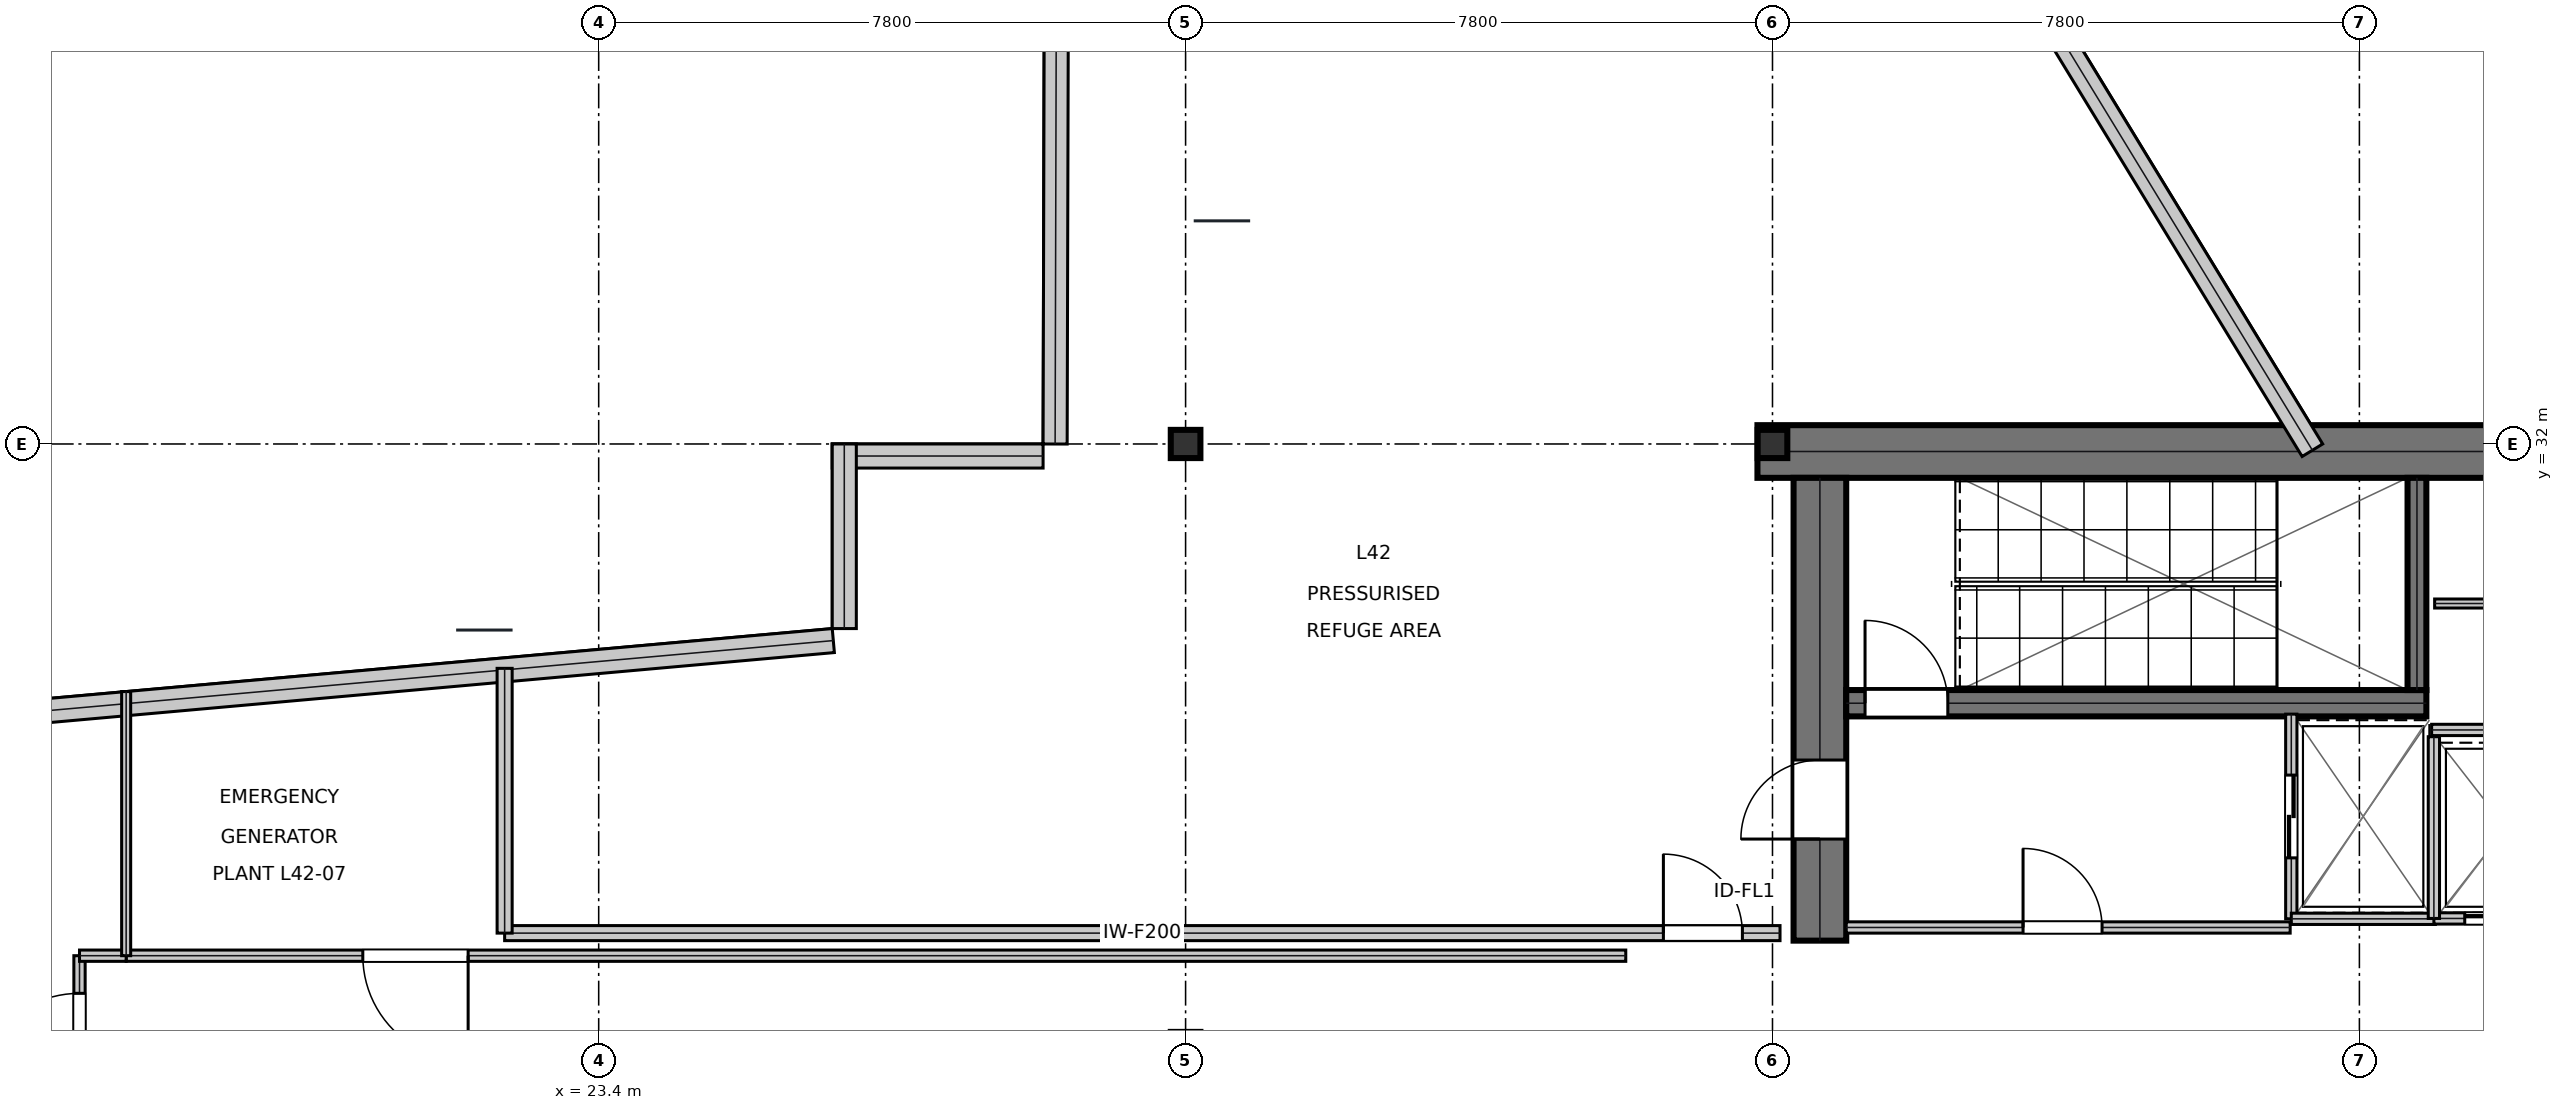
"""IFC4 building model, lengths in metres.
Left out: names, types, materials, properties, quantities, classifications, styles, units other than length and angle.
Written with IfcOpenShell. Run it as: python <this file> out.ifc"""

import sys

from ifc_helpers import new_model, si_unit, direction, frame, frame_2d, origin, origin_2d, place, context, subcontext, project, spatial, rectangle, i_section, extrude, element, fill, save


model = new_model("IFC4")
c1 = context("Model", 3, precision=1e-05, world=origin(), true_north=direction((0.0, 1.0)))
c2 = subcontext(c1, "Body", "Model", "MODEL_VIEW")
j1 = project(units=[si_unit("LENGTHUNIT", "METRE"), si_unit("PLANEANGLEUNIT", "RADIAN")], contexts=[c1])
p1 = place(None, origin())
s1 = spatial("IfcSite", under=j1, at=p1, CompositionType="ELEMENT")
p2 = place(p1, origin())
s2 = spatial("IfcBuilding", under=s1, at=p2, CompositionType="ELEMENT")
p3 = place(p2, frame((0.0, 0.0, 181.65)))
s3 = spatial("IfcBuildingStorey", under=s2, at=p3, CompositionType="ELEMENT", Elevation=181.65)
p4 = place(p3, frame((38.8, 31.9, 0.0), z_axis=(0.0, 0.0, 1.0), x_axis=(1.0, 0.0, 0.0)))
e1 = element("IfcWall", 1, at=p4, inside=s3, PredefinedType="SHEAR", context=c2, shape_type="SweptSolid", body=[
    extrude(rectangle(XDim=16.0, YDim=0.7, at=frame_2d((8.0, 0.0))), origin(), (0.0, 0.0, 1.0), 5.12),
])
p5 = place(p3, frame((39.63, 25.4, 0.0), z_axis=(0.0, 0.0, 1.0), x_axis=(0.0, 1.0, 0.0)))
e2 = element("IfcWall", 2, at=p5, inside=s3, PredefinedType="SHEAR", context=c2, shape_type="SweptSolid", body=[
    extrude(rectangle(XDim=6.15, YDim=0.7, at=frame_2d((3.075, 0.0))), origin(), (0.0, 0.0, 1.0), 5.12),
])
p6 = place(p5, frame((1.35, 0.0, 0.0)))
e3 = element("IfcOpeningElement", 3, at=p6, cuts=e2, PredefinedType="OPENING", context=c2, shape_type="SweptSolid", body=[
    extrude(rectangle(XDim=1.05, YDim=2.15, at=frame_2d((0.525, 1.075))), frame((0.0, 0.36, 0.0), z_axis=(0.0, -1.0, 0.0), x_axis=(1.0, 0.0, 0.0)), (0.0, 0.0, 1.0), 0.72),
])
p7 = place(p3, frame((39.98, 28.555, 0.0), z_axis=(0.0, 0.0, 1.0), x_axis=(1.0, 0.0, 0.0)))
e4 = element("IfcWall", 4, at=p7, inside=s3, PredefinedType="SHEAR", context=c2, shape_type="SweptSolid", body=[
    extrude(rectangle(XDim=7.71, YDim=0.35, at=frame_2d((3.855, 0.0))), origin(), (0.0, 0.0, 1.0), 5.12),
])
p8 = place(p7, frame((0.25, 0.0, 0.0)))
e5 = element("IfcOpeningElement", 5, at=p8, cuts=e4, PredefinedType="OPENING", context=c2, shape_type="SweptSolid", body=[
    extrude(rectangle(XDim=1.1, YDim=2.15, at=frame_2d((0.55, 1.075))), frame((0.0, 0.185, 0.0), z_axis=(0.0, -1.0, 0.0), x_axis=(1.0, 0.0, 0.0)), (0.0, 0.0, 1.0), 0.37),
])
p9 = place(p3, frame((47.565, 28.73, 0.0), z_axis=(0.0, 0.0, 1.0), x_axis=(0.0, 1.0, 0.0)))
e6 = element("IfcWall", 6, at=p9, inside=s3, PredefinedType="SHEAR", context=c2, shape_type="SweptSolid", body=[
    extrude(rectangle(XDim=2.82, YDim=0.25, at=frame_2d((1.41, 0.0))), origin(), (0.0, 0.0, 1.0), 5.12),
])
for number, where, z_axis, x_axis in (
    (7, (31.2, 32.0, 0.0), (0.0, 0.0, 1.0), (1.0, 0.0, 0.0)),
    (8, (39.0, 32.0, 0.0), (0.0, 0.0, 1.0), (1.0, 0.0, 0.0)),
):
    element("IfcColumn", number, at=place(p3, frame(where, z_axis=z_axis, x_axis=x_axis)), inside=s3, PredefinedType="COLUMN", context=c2, shape_type="SweptSolid", body=[
        extrude(i_section(OverallWidth=0.394, OverallDepth=0.375, WebThickness=0.017, FlangeThickness=0.028, at=origin_2d()), origin(), (0.0, 0.0, 1.0), 5.394),
    ])
p10 = place(p3, frame((46.176, 31.917, 0.0), z_axis=(0.0, 0.0, 1.0), x_axis=(-0.520630135962, 0.853782326784, 0.0)))
e9 = element("IfcWall", 9, at=p10, inside=s3, PredefinedType="STANDARD", context=c2, shape_type="SweptSolid", body=[
    extrude(rectangle(XDim=9.747, YDim=0.32, at=frame_2d((4.874, 0.0))), origin(), (0.0, 0.0, 1.0), 4.649),
])
p11 = place(p3, frame((29.489, 40.453, 0.0), z_axis=(0.0, 0.0, 1.0), x_axis=(-0.002657107071, -0.999996469885, 0.0)))
e10 = element("IfcWall", 10, at=p11, inside=s3, PredefinedType="STANDARD", context=c2, shape_type="SweptSolid", body=[
    extrude(rectangle(XDim=8.453, YDim=0.32, at=frame_2d((4.227, 0.0))), origin(), (0.0, 0.0, 1.0), 5.12),
])
p12 = place(p3, frame((29.306, 31.84, 0.0), z_axis=(0.0, 0.0, 1.0), x_axis=(-1.0, 0.0, 0.0)))
e11 = element("IfcWall", 11, at=p12, inside=s3, PredefinedType="STANDARD", context=c2, shape_type="SweptSolid", body=[
    extrude(rectangle(XDim=2.802, YDim=0.32, at=frame_2d((1.401, 0.0))), origin(), (0.0, 0.0, 1.0), 5.12),
])
p13 = place(p3, frame((26.664, 32.0, 0.0), z_axis=(0.0, 0.0, 1.0), x_axis=(0.0, -1.0, 0.0)))
e12 = element("IfcWall", 12, at=p13, inside=s3, PredefinedType="STANDARD", context=c2, shape_type="SweptSolid", body=[
    extrude(rectangle(XDim=2.453, YDim=0.32, at=frame_2d((1.227, 0.0))), origin(), (0.0, 0.0, 1.0), 4.649),
])
p14 = place(p3, frame((26.518, 29.387, 0.0), z_axis=(0.0, 0.0, 1.0), x_axis=(-0.996045822268, -0.088840981215, 0.0)))
e13 = element("IfcWall", 13, at=p14, inside=s3, PredefinedType="STANDARD", context=c2, shape_type="SweptSolid", body=[
    extrude(rectangle(XDim=13.457, YDim=0.32, at=frame_2d((6.729, 0.0))), origin(), (0.0, 0.0, 1.0), 4.649),
])
p15 = place(p3, frame((39.98, 25.575, 0.0), z_axis=(0.0, 0.0, 1.0), x_axis=(1.0, 0.0, 0.0)))
e14 = element("IfcWall", 14, at=p15, inside=s3, PredefinedType="PARTITIONING", context=c2, shape_type="SweptSolid", body=[
    extrude(rectangle(XDim=5.9, YDim=0.15, at=frame_2d((2.95, 0.0))), origin(), (0.0, 0.0, 1.0), 5.12),
])
p16 = place(p15, frame((2.35, 0.0, 0.0)))
e15 = element("IfcOpeningElement", 15, at=p16, cuts=e14, PredefinedType="OPENING", context=c2, shape_type="SweptSolid", body=[
    extrude(rectangle(XDim=1.05, YDim=2.15, at=frame_2d((0.525, 1.075))), frame((0.0, 0.085, 0.0), z_axis=(0.0, -1.0, 0.0), x_axis=(1.0, 0.0, 0.0)), (0.0, 0.0, 1.0), 0.17),
])
p17 = place(p3, frame((45.895, 25.69, 0.0), z_axis=(0.0, 0.0, 1.0), x_axis=(0.0, 1.0, 0.0)))
e16 = element("IfcWall", 16, at=p17, inside=s3, PredefinedType="PARTITIONING", context=c2, shape_type="SweptSolid", body=[
    extrude(rectangle(XDim=2.72, YDim=0.15, at=frame_2d((1.36, 0.0))), origin(), (0.0, 0.0, 1.0), 5.12),
])
p18 = place(p17, frame((0.81, 0.0, 0.0)))
e17 = element("IfcOpeningElement", 17, at=p18, cuts=e16, PredefinedType="OPENING", context=c2, shape_type="SweptSolid", body=[
    extrude(rectangle(XDim=1.1, YDim=2.15, at=frame_2d((0.55, 1.075))), frame((0.0, 0.085, 0.0), z_axis=(0.0, -1.0, 0.0), x_axis=(1.0, 0.0, 0.0)), (0.0, 0.0, 1.0), 0.17),
])
p19 = place(p3, frame((45.895, 25.69, 0.0), z_axis=(0.0, 0.0, 1.0), x_axis=(1.0, 0.0, 0.0)))
e18 = element("IfcWall", 18, at=p19, inside=s3, PredefinedType="PARTITIONING", context=c2, shape_type="SweptSolid", body=[
    extrude(rectangle(XDim=1.915, YDim=0.15, at=frame_2d((0.958, 0.0))), origin(), (0.0, 0.0, 1.0), 5.12),
])
p20 = place(p3, frame((47.79, 25.695, 0.0), z_axis=(0.0, 0.0, 1.0), x_axis=(1.0, 0.0, 0.0)))
e19 = element("IfcWall", 19, at=p20, inside=s3, PredefinedType="PARTITIONING", context=c2, shape_type="SweptSolid", body=[
    extrude(rectangle(XDim=1.92, YDim=0.15, at=frame_2d((0.96, 0.0))), origin(), (0.0, 0.0, 1.0), 5.12),
])
p21 = place(p20, frame((0.41, 0.0, 0.0)))
e20 = element("IfcOpeningElement", 20, at=p21, cuts=e19, PredefinedType="OPENING", context=c2, shape_type="SweptSolid", body=[
    extrude(rectangle(XDim=1.1, YDim=2.15, at=frame_2d((0.55, 1.075))), frame((0.0, 0.085, 0.0), z_axis=(0.0, -1.0, 0.0), x_axis=(1.0, 0.0, 0.0)), (0.0, 0.0, 1.0), 0.17),
])
p22 = place(p3, frame((47.79, 25.695, 0.0), z_axis=(0.0, 0.0, 1.0), x_axis=(0.0, 1.0, 0.0)))
e21 = element("IfcWall", 21, at=p22, inside=s3, PredefinedType="PARTITIONING", context=c2, shape_type="SweptSolid", body=[
    extrude(rectangle(XDim=2.415, YDim=0.15, at=frame_2d((1.208, 0.0))), origin(), (0.0, 0.0, 1.0), 5.12),
])
p23 = place(p3, frame((47.76, 28.2, 0.0), z_axis=(0.0, 0.0, 1.0), x_axis=(1.0, 0.0, 0.0)))
e22 = element("IfcWall", 22, at=p23, inside=s3, PredefinedType="PARTITIONING", context=c2, shape_type="SweptSolid", body=[
    extrude(rectangle(XDim=1.99, YDim=0.15, at=frame_2d((0.995, 0.0))), origin(), (0.0, 0.0, 1.0), 5.12),
])
p24 = place(p3, frame((47.8, 29.88, 0.0), z_axis=(0.0, 0.0, 1.0), x_axis=(1.0, 0.0, 0.0)))
e23 = element("IfcWall", 23, at=p24, inside=s3, PredefinedType="PARTITIONING", context=c2, shape_type="SweptSolid", body=[
    extrude(rectangle(XDim=5.86, YDim=0.12, at=frame_2d((2.93, 0.0))), origin(), (0.0, 0.0, 1.0), 5.12),
])
p25 = place(p24, frame((2.5, 0.0, 0.0)))
e24 = element("IfcOpeningElement", 24, at=p25, cuts=e23, PredefinedType="OPENING", context=c2, shape_type="SweptSolid", body=[
    extrude(rectangle(XDim=0.85, YDim=2.15, at=frame_2d((0.425, 1.075))), frame((0.0, 0.07, 0.0), z_axis=(0.0, -1.0, 0.0), x_axis=(1.0, 0.0, 0.0)), (0.0, 0.0, 1.0), 0.14),
])
p26 = place(p3, frame((22.15, 25.5, 0.0), z_axis=(0.0, 0.0, 1.0), x_axis=(1.0, 0.0, 0.0)))
e25 = element("IfcWall", 25, at=p26, inside=s3, PredefinedType="SOLIDWALL", context=c2, shape_type="SweptSolid", body=[
    extrude(rectangle(XDim=16.95, YDim=0.2, at=frame_2d((8.475, 0.0))), origin(), (0.0, 0.0, 1.0), 4.571),
])
p27 = place(p26, frame((15.4, 0.0, 0.0)))
e26 = element("IfcOpeningElement", 26, at=p27, cuts=e25, PredefinedType="OPENING", context=c2, shape_type="SweptSolid", body=[
    extrude(rectangle(XDim=1.05, YDim=2.15, at=frame_2d((0.525, 1.075))), frame((0.0, 0.11, 0.0), z_axis=(0.0, -1.0, 0.0), x_axis=(1.0, 0.0, 0.0)), (0.0, 0.0, 1.0), 0.22),
])
p28 = place(p3, frame((22.15, 25.5, 0.0), z_axis=(0.0, 0.0, 1.0), x_axis=(0.0, 1.0, 0.0)))
e27 = element("IfcWall", 27, at=p28, inside=s3, PredefinedType="SOLIDWALL", context=c2, shape_type="SweptSolid", body=[
    extrude(rectangle(XDim=3.519, YDim=0.2, at=frame_2d((1.759, 0.0))), origin(), (0.0, 0.0, 1.0), 4.571),
])
p29 = place(p3, frame((16.5, 22.8, 0.0), z_axis=(0.0, 0.0, 1.0), x_axis=(0.0, 1.0, 0.0)))
e28 = element("IfcWall", 28, at=p29, inside=s3, PredefinedType="PARTITIONING", context=c2, shape_type="SweptSolid", body=[
    extrude(rectangle(XDim=2.4, YDim=0.15, at=frame_2d((1.2, 0.0))), origin(), (0.0, 0.0, 1.0), 5.12),
])
p30 = place(p29, frame((0.5, 0.0, 0.0)))
e29 = element("IfcOpeningElement", 29, at=p30, cuts=e28, PredefinedType="OPENING", context=c2, shape_type="SweptSolid", body=[
    extrude(rectangle(XDim=1.4, YDim=2.2, at=frame_2d((0.7, 1.1))), frame((0.0, 0.085, 0.0), z_axis=(0.0, -1.0, 0.0), x_axis=(1.0, 0.0, 0.0)), (0.0, 0.0, 1.0), 0.17),
])
p31 = place(p3, frame((17.12, 25.2, 0.0), z_axis=(0.0, 0.0, 1.0), x_axis=(1.0, 0.0, 0.0)))
e30 = element("IfcWall", 30, at=p31, inside=s3, PredefinedType="PARTITIONING", context=c2, shape_type="SweptSolid", body=[
    extrude(rectangle(XDim=19.93, YDim=0.15, at=frame_2d((9.965, 0.0))), origin(), (0.0, 0.0, 1.0), 4.571),
])
p32 = place(p31, frame((3.145, 0.0, 0.0)))
e31 = element("IfcOpeningElement", 31, at=p32, cuts=e30, PredefinedType="OPENING", context=c2, shape_type="SweptSolid", body=[
    extrude(rectangle(XDim=1.4, YDim=2.2, at=frame_2d((0.7, 1.1))), frame((0.0, 0.085, 0.0), z_axis=(0.0, -1.0, 0.0), x_axis=(1.0, 0.0, 0.0)), (0.0, 0.0, 1.0), 0.17),
])
p33 = place(p3, frame((16.5, 25.2, 0.0), z_axis=(0.0, 0.0, 1.0), x_axis=(1.0, 0.0, 0.0)))
e32 = element("IfcWall", 32, at=p33, inside=s3, PredefinedType="PARTITIONING", context=c2, shape_type="SweptSolid", body=[
    extrude(rectangle(XDim=0.62, YDim=0.15, at=frame_2d((0.31, 0.0))), origin(), (0.0, 0.0, 1.0), 5.12),
])
p34 = place(p3, frame((17.12, 25.2, 0.0), z_axis=(0.0, 0.0, 1.0), x_axis=(0.0, 1.0, 0.0)))
e33 = element("IfcWall", 33, at=p34, inside=s3, PredefinedType="PARTITIONING", context=c2, shape_type="SweptSolid", body=[
    extrude(rectangle(XDim=3.51, YDim=0.12, at=frame_2d((1.755, 0.0))), origin(), (0.0, 0.0, 1.0), 4.571),
])
p35 = place(p16, origin())
e34 = element("IfcDoor", 34, at=p35, inside=s3, OperationType="SINGLE_SWING_LEFT", PredefinedType="DOOR", context=c2, shape_type="SweptSolid", body=[
    extrude(rectangle(XDim=1.05, YDim=2.15, at=frame_2d((0.525, 1.075))), frame((0.0, 0.025, 0.0), z_axis=(0.0, -1.0, 0.0), x_axis=(1.0, 0.0, 0.0)), (0.0, 0.0, 1.0), 0.05),
])
fill(e15, e34)
p36 = place(p18, frame((1.1, 0.0, 0.0), z_axis=(0.0, 0.0, 1.0), x_axis=(-1.0, 0.0, 0.0)))
e35 = element("IfcDoor", 35, at=p36, inside=s3, OperationType="DOUBLE_DOOR_SLIDING", PredefinedType="DOOR", context=c2, shape_type="SweptSolid", body=[
    extrude(rectangle(XDim=1.1, YDim=2.15, at=frame_2d((0.55, 1.075))), frame((0.0, 0.025, 0.0), z_axis=(0.0, -1.0, 0.0), x_axis=(1.0, 0.0, 0.0)), (0.0, 0.0, 1.0), 0.05),
])
fill(e17, e35)
p37 = place(p21, frame((1.1, 0.0, 0.0), z_axis=(0.0, 0.0, 1.0), x_axis=(-1.0, 0.0, 0.0)))
e36 = element("IfcDoor", 36, at=p37, inside=s3, OperationType="DOUBLE_DOOR_SLIDING", PredefinedType="DOOR", context=c2, shape_type="SweptSolid", body=[
    extrude(rectangle(XDim=1.1, YDim=2.15, at=frame_2d((0.55, 1.075))), frame((0.0, 0.025, 0.0), z_axis=(0.0, -1.0, 0.0), x_axis=(1.0, 0.0, 0.0)), (0.0, 0.0, 1.0), 0.05),
])
fill(e20, e36)
p38 = place(p27, origin())
e37 = element("IfcDoor", 37, at=p38, inside=s3, OperationType="SINGLE_SWING_LEFT", PredefinedType="DOOR", context=c2, shape_type="SweptSolid", body=[
    extrude(rectangle(XDim=1.05, YDim=2.15, at=frame_2d((0.525, 1.075))), frame((0.0, 0.025, 0.0), z_axis=(0.0, -1.0, 0.0), x_axis=(1.0, 0.0, 0.0)), (0.0, 0.0, 1.0), 0.05),
])
fill(e26, e37)
p39 = place(p30, origin())
e38 = element("IfcDoor", 38, at=p39, inside=s3, OperationType="SINGLE_SWING_LEFT", PredefinedType="DOOR", context=c2, shape_type="SweptSolid", body=[
    extrude(rectangle(XDim=1.4, YDim=2.2, at=frame_2d((0.7, 1.1))), frame((0.0, 0.025, 0.0), z_axis=(0.0, -1.0, 0.0), x_axis=(1.0, 0.0, 0.0)), (0.0, 0.0, 1.0), 0.05),
])
fill(e29, e38)
p40 = place(p32, frame((1.4, 0.0, 0.0), z_axis=(0.0, 0.0, 1.0), x_axis=(-1.0, 0.0, 0.0)))
e39 = element("IfcDoor", 39, at=p40, inside=s3, OperationType="SINGLE_SWING_LEFT", PredefinedType="DOOR", context=c2, shape_type="SweptSolid", body=[
    extrude(rectangle(XDim=1.4, YDim=2.2, at=frame_2d((0.7, 1.1))), frame((0.0, 0.025, 0.0), z_axis=(0.0, -1.0, 0.0), x_axis=(1.0, 0.0, 0.0)), (0.0, 0.0, 1.0), 0.05),
])
fill(e31, e39)
p41 = place(p8, origin())
e40 = element("IfcDoor", 40, at=p41, inside=s3, OperationType="SINGLE_SWING_LEFT", PredefinedType="DOOR", context=c2, shape_type="SweptSolid", body=[
    extrude(rectangle(XDim=1.1, YDim=2.15, at=frame_2d((0.55, 1.075))), frame((0.0, 0.025, 0.0), z_axis=(0.0, -1.0, 0.0), x_axis=(1.0, 0.0, 0.0)), (0.0, 0.0, 1.0), 0.05),
])
fill(e5, e40)
p42 = place(p6, origin())
e41 = element("IfcDoor", 41, at=p42, inside=s3, OperationType="SINGLE_SWING_LEFT", PredefinedType="DOOR", context=c2, shape_type="SweptSolid", body=[
    extrude(rectangle(XDim=1.05, YDim=2.15, at=frame_2d((0.525, 1.075))), frame((0.0, 0.025, 0.0), z_axis=(0.0, -1.0, 0.0), x_axis=(1.0, 0.0, 0.0)), (0.0, 0.0, 1.0), 0.05),
])
fill(e3, e41)
save(model, sys.argv[1])
